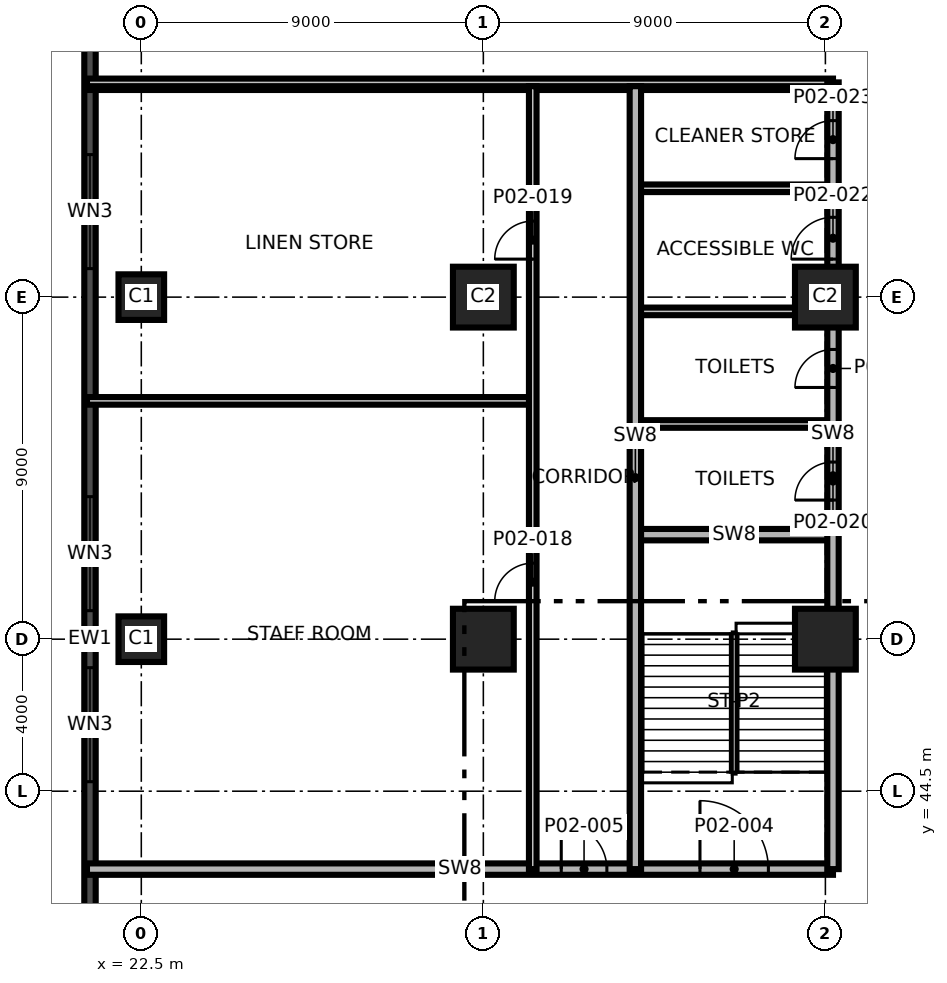
"""IFC4 building model, lengths in metres.
Left out: names, types, materials, properties, quantities, classifications, styles, units other than length and angle.
Written with IfcOpenShell. Run it as: python <this file> out.ifc"""

import sys

from ifc_helpers import new_model, si_unit, direction, frame, frame_2d, origin, origin_2d, place, context, subcontext, project, spatial, rectangle, extrude, element, fill, save


model = new_model("IFC4")
c1 = context("Model", 3, precision=1e-05, world=origin(), true_north=direction((0.0, 1.0)))
c2 = subcontext(c1, "Body", "Model", "MODEL_VIEW")
j1 = project(units=[si_unit("LENGTHUNIT", "METRE"), si_unit("PLANEANGLEUNIT", "RADIAN")], contexts=[c1])
p1 = place(None, origin())
s1 = spatial("IfcSite", under=j1, at=p1, CompositionType="ELEMENT")
p2 = place(p1, origin())
s2 = spatial("IfcBuilding", under=s1, at=p2, CompositionType="ELEMENT")
p3 = place(p2, frame((0.0, 0.0, 13.5)))
s3 = spatial("IfcBuildingStorey", under=s2, at=p3, CompositionType="ELEMENT", Elevation=13.5)
p4 = place(p3, frame((22.5, 48.5, 0.0), z_axis=(0.0, 0.0, 1.0), x_axis=(1.0, 0.0, 0.0)))
e1 = element("IfcColumn", 1, at=p4, inside=s3, PredefinedType="COLUMN", context=c2, shape_type="SweptSolid", body=[
    extrude(rectangle(XDim=1.2, YDim=1.2, at=origin_2d()), origin(), (0.0, 0.0, 1.0), 5.0),
])
for number, where, z_axis, x_axis in (
    (2, (31.5, 48.5, 0.0), (0.0, 0.0, 1.0), (1.0, 0.0, 0.0)),
    (3, (40.5, 48.5, 0.0), (0.0, 0.0, 1.0), (1.0, 0.0, 0.0)),
):
    element("IfcColumn", number, at=place(p3, frame(where, z_axis=z_axis, x_axis=x_axis)), inside=s3, PredefinedType="COLUMN", context=c2, shape_type="SweptSolid", body=[
        extrude(rectangle(XDim=1.6, YDim=1.6, at=origin_2d()), origin(), (0.0, 0.0, 1.0), 5.0),
    ])
p5 = place(p3, frame((22.5, 57.5, 0.0), z_axis=(0.0, 0.0, 1.0), x_axis=(1.0, 0.0, 0.0)))
e4 = element("IfcColumn", 4, at=p5, inside=s3, PredefinedType="COLUMN", context=c2, shape_type="SweptSolid", body=[
    extrude(rectangle(XDim=1.2, YDim=1.2, at=origin_2d()), origin(), (0.0, 0.0, 1.0), 5.0),
])
for number, where, z_axis, x_axis in (
    (5, (31.5, 57.5, 0.0), (0.0, 0.0, 1.0), (1.0, 0.0, 0.0)),
    (6, (40.5, 57.5, 0.0), (0.0, 0.0, 1.0), (1.0, 0.0, 0.0)),
):
    element("IfcColumn", number, at=place(p3, frame(where, z_axis=z_axis, x_axis=x_axis)), inside=s3, PredefinedType="COLUMN", context=c2, shape_type="SweptSolid", body=[
        extrude(rectangle(XDim=1.6, YDim=1.6, at=origin_2d()), origin(), (0.0, 0.0, 1.0), 5.0),
    ])
p6 = place(p3, frame((21.15, 79.952, 0.0), z_axis=(0.0, 0.0, 1.0), x_axis=(0.0, -1.0, 0.0)))
e7 = element("IfcWall", 7, at=p6, inside=s3, PredefinedType="SOLIDWALL", context=c2, shape_type="SweptSolid", body=[
    extrude(rectangle(XDim=62.88, YDim=0.3, at=frame_2d((31.44, 0.0))), origin(), (0.0, 0.0, 1.0), 4.7),
])
p7 = place(p6, frame((0.726, 0.0, 0.9)))
e8 = element("IfcOpeningElement", 8, at=p7, cuts=e7, PredefinedType="OPENING", context=c2, shape_type="SweptSolid", body=[
    extrude(rectangle(XDim=3.0, YDim=2.4, at=frame_2d((1.5, 1.2))), frame((0.0, 0.16, 0.0), z_axis=(0.0, -1.0, 0.0), x_axis=(1.0, 0.0, 0.0)), (0.0, 0.0, 1.0), 0.32),
])
p8 = place(p6, frame((5.202, 0.0, 0.9)))
e9 = element("IfcOpeningElement", 9, at=p8, cuts=e7, PredefinedType="OPENING", context=c2, shape_type="SweptSolid", body=[
    extrude(rectangle(XDim=3.0, YDim=2.4, at=frame_2d((1.5, 1.2))), frame((0.0, 0.16, 0.0), z_axis=(0.0, -1.0, 0.0), x_axis=(1.0, 0.0, 0.0)), (0.0, 0.0, 1.0), 0.32),
])
p9 = place(p6, frame((9.702, 0.0, 0.9)))
e10 = element("IfcOpeningElement", 10, at=p9, cuts=e7, PredefinedType="OPENING", context=c2, shape_type="SweptSolid", body=[
    extrude(rectangle(XDim=3.0, YDim=2.4, at=frame_2d((1.5, 1.2))), frame((0.0, 0.16, 0.0), z_axis=(0.0, -1.0, 0.0), x_axis=(1.0, 0.0, 0.0)), (0.0, 0.0, 1.0), 0.32),
])
p10 = place(p6, frame((18.702, 0.0, 0.9)))
e11 = element("IfcOpeningElement", 11, at=p10, cuts=e7, PredefinedType="OPENING", context=c2, shape_type="SweptSolid", body=[
    extrude(rectangle(XDim=3.0, YDim=2.4, at=frame_2d((1.5, 1.2))), frame((0.0, 0.16, 0.0), z_axis=(0.0, -1.0, 0.0), x_axis=(1.0, 0.0, 0.0)), (0.0, 0.0, 1.0), 0.32),
])
p11 = place(p6, frame((27.702, 0.0, 0.9)))
e12 = element("IfcOpeningElement", 12, at=p11, cuts=e7, PredefinedType="OPENING", context=c2, shape_type="SweptSolid", body=[
    extrude(rectangle(XDim=3.0, YDim=2.4, at=frame_2d((1.5, 1.2))), frame((0.0, 0.16, 0.0), z_axis=(0.0, -1.0, 0.0), x_axis=(1.0, 0.0, 0.0)), (0.0, 0.0, 1.0), 0.32),
])
p12 = place(p6, frame((32.202, 0.0, 0.9)))
e13 = element("IfcOpeningElement", 13, at=p12, cuts=e7, PredefinedType="OPENING", context=c2, shape_type="SweptSolid", body=[
    extrude(rectangle(XDim=3.0, YDim=2.4, at=frame_2d((1.5, 1.2))), frame((0.0, 0.16, 0.0), z_axis=(0.0, -1.0, 0.0), x_axis=(1.0, 0.0, 0.0)), (0.0, 0.0, 1.0), 0.32),
])
p13 = place(p6, frame((41.202, 0.0, 0.9)))
e14 = element("IfcOpeningElement", 14, at=p13, cuts=e7, PredefinedType="OPENING", context=c2, shape_type="SweptSolid", body=[
    extrude(rectangle(XDim=3.0, YDim=2.4, at=frame_2d((1.5, 1.2))), frame((0.0, 0.16, 0.0), z_axis=(0.0, -1.0, 0.0), x_axis=(1.0, 0.0, 0.0)), (0.0, 0.0, 1.0), 0.32),
])
p14 = place(p6, frame((45.702, 0.0, 0.9)))
e15 = element("IfcOpeningElement", 15, at=p14, cuts=e7, PredefinedType="OPENING", context=c2, shape_type="SweptSolid", body=[
    extrude(rectangle(XDim=3.0, YDim=2.4, at=frame_2d((1.5, 1.2))), frame((0.0, 0.16, 0.0), z_axis=(0.0, -1.0, 0.0), x_axis=(1.0, 0.0, 0.0)), (0.0, 0.0, 1.0), 0.32),
])
p15 = place(p6, frame((50.202, 0.0, 0.9)))
e16 = element("IfcOpeningElement", 16, at=p15, cuts=e7, PredefinedType="OPENING", context=c2, shape_type="SweptSolid", body=[
    extrude(rectangle(XDim=3.0, YDim=2.4, at=frame_2d((1.5, 1.2))), frame((0.0, 0.16, 0.0), z_axis=(0.0, -1.0, 0.0), x_axis=(1.0, 0.0, 0.0)), (0.0, 0.0, 1.0), 0.32),
])
p16 = place(p6, frame((54.702, 0.0, 0.9)))
e17 = element("IfcOpeningElement", 17, at=p16, cuts=e7, PredefinedType="OPENING", context=c2, shape_type="SweptSolid", body=[
    extrude(rectangle(XDim=3.0, YDim=2.4, at=frame_2d((1.5, 1.2))), frame((0.0, 0.16, 0.0), z_axis=(0.0, -1.0, 0.0), x_axis=(1.0, 0.0, 0.0)), (0.0, 0.0, 1.0), 0.32),
])
p17 = place(p6, frame((59.226, 0.0, 0.9)))
e18 = element("IfcOpeningElement", 18, at=p17, cuts=e7, PredefinedType="OPENING", context=c2, shape_type="SweptSolid", body=[
    extrude(rectangle(XDim=3.0, YDim=2.4, at=frame_2d((1.5, 1.2))), frame((0.0, 0.16, 0.0), z_axis=(0.0, -1.0, 0.0), x_axis=(1.0, 0.0, 0.0)), (0.0, 0.0, 1.0), 0.32),
])
p18 = place(p3, frame((21.07, 42.45, 0.0), z_axis=(0.0, 0.0, 1.0), x_axis=(1.0, 0.0, 0.0)))
e19 = element("IfcWall", 19, at=p18, inside=s3, PredefinedType="SHEAR", context=c2, shape_type="SweptSolid", body=[
    extrude(rectangle(XDim=19.63, YDim=0.3, at=frame_2d((9.815, 0.0))), origin(), (0.0, 0.0, 1.0), 4.7),
])
p19 = place(p18, frame((16.13, 0.0, 0.0)))
e20 = element("IfcOpeningElement", 20, at=p19, cuts=e19, PredefinedType="OPENING", context=c2, shape_type="SweptSolid", body=[
    extrude(rectangle(XDim=1.8, YDim=2.1, at=frame_2d((0.9, 1.05))), frame((0.0, 0.16, 0.0), z_axis=(0.0, -1.0, 0.0), x_axis=(1.0, 0.0, 0.0)), (0.0, 0.0, 1.0), 0.32),
])
p20 = place(p18, frame((12.48, 0.0, 0.0)))
e21 = element("IfcOpeningElement", 21, at=p20, cuts=e19, PredefinedType="OPENING", context=c2, shape_type="SweptSolid", body=[
    extrude(rectangle(XDim=1.2, YDim=2.1, at=frame_2d((0.6, 1.05))), frame((0.0, 0.16, 0.0), z_axis=(0.0, -1.0, 0.0), x_axis=(1.0, 0.0, 0.0)), (0.0, 0.0, 1.0), 0.32),
])
p21 = place(p3, frame((35.5, 51.25, 0.0), z_axis=(0.0, 0.0, 1.0), x_axis=(1.0, 0.0, 0.0)))
e22 = element("IfcWall", 22, at=p21, inside=s3, PredefinedType="SHEAR", context=c2, shape_type="SweptSolid", body=[
    extrude(rectangle(XDim=5.2, YDim=0.3, at=frame_2d((2.6, 0.0))), origin(), (0.0, 0.0, 1.0), 4.7),
])
p22 = place(p3, frame((35.55, 54.162, 0.0), z_axis=(0.0, 0.0, 1.0), x_axis=(1.0, 0.0, 0.0)))
e23 = element("IfcWall", 23, at=p22, inside=s3, PredefinedType="PARTITIONING", context=c2, shape_type="SweptSolid", body=[
    extrude(rectangle(XDim=5.15, YDim=0.2, at=frame_2d((2.575, 0.0))), origin(), (0.0, 0.0, 1.0), 4.7),
])
p23 = place(p3, frame((21.07, 54.77, 0.0), z_axis=(0.0, 0.0, 1.0), x_axis=(1.0, 0.0, 0.0)))
e24 = element("IfcWall", 24, at=p23, inside=s3, PredefinedType="PARTITIONING", context=c2, shape_type="SweptSolid", body=[
    extrude(rectangle(XDim=11.73, YDim=0.2, at=frame_2d((5.865, 0.0))), origin(), (0.0, 0.0, 1.0), 4.7),
])
for number, where, z_axis, x_axis in (
    (25, (35.55, 57.125, 0.0), (0.0, 0.0, 1.0), (1.0, 0.0, 0.0)),
    (26, (35.55, 60.364, 0.0), (0.0, 0.0, 1.0), (1.0, 0.0, 0.0)),
):
    element("IfcWall", number, at=place(p3, frame(where, z_axis=z_axis, x_axis=x_axis)), inside=s3, PredefinedType="PARTITIONING", context=c2, shape_type="SweptSolid", body=[
        extrude(rectangle(XDim=5.15, YDim=0.2, at=frame_2d((2.575, 0.0))), origin(), (0.0, 0.0, 1.0), 4.7),
    ])
p24 = place(p3, frame((21.07, 63.05, 0.0), z_axis=(0.0, 0.0, 1.0), x_axis=(1.0, 0.0, 0.0)))
e27 = element("IfcWall", 27, at=p24, inside=s3, PredefinedType="PARTITIONING", context=c2, shape_type="SweptSolid", body=[
    extrude(rectangle(XDim=14.43, YDim=0.2, at=frame_2d((7.215, 0.0))), origin(), (0.0, 0.0, 1.0), 4.7),
])
p25 = place(p3, frame((35.55, 63.05, 0.0), z_axis=(0.0, 0.0, 1.0), x_axis=(1.0, 0.0, 0.0)))
e28 = element("IfcWall", 28, at=p25, inside=s3, PredefinedType="PARTITIONING", context=c2, shape_type="SweptSolid", body=[
    extrude(rectangle(XDim=5.15, YDim=0.2, at=frame_2d((2.575, 0.0))), origin(), (0.0, 0.0, 1.0), 4.7),
])
p26 = place(p3, frame((21.07, 63.15, 0.0), z_axis=(0.0, 0.0, 1.0), x_axis=(1.0, 0.0, 0.0)))
e29 = element("IfcWall", 29, at=p26, inside=s3, PredefinedType="PARTITIONING", context=c2, shape_type="SweptSolid", body=[
    extrude(rectangle(XDim=19.63, YDim=0.2, at=frame_2d((9.815, 0.0))), origin(), (0.0, 0.0, 1.0), 4.7),
])
p27 = place(p3, frame((32.8, 42.45, 0.0), z_axis=(0.0, 0.0, 1.0), x_axis=(0.0, 1.0, 0.0)))
e30 = element("IfcWall", 30, at=p27, inside=s3, PredefinedType="PARTITIONING", context=c2, shape_type="SweptSolid", body=[
    extrude(rectangle(XDim=20.6, YDim=0.2, at=frame_2d((10.3, 0.0))), origin(), (0.0, 0.0, 1.0), 4.7),
])
p28 = place(p27, frame((7.05, 0.0, 0.0)))
e31 = element("IfcOpeningElement", 31, at=p28, cuts=e30, PredefinedType="OPENING", context=c2, shape_type="SweptSolid", body=[
    extrude(rectangle(XDim=1.0, YDim=2.1, at=frame_2d((0.5, 1.05))), frame((0.0, 0.11, 0.0), z_axis=(0.0, -1.0, 0.0), x_axis=(1.0, 0.0, 0.0)), (0.0, 0.0, 1.0), 0.22),
])
p29 = place(p27, frame((16.05, 0.0, 0.0)))
e32 = element("IfcOpeningElement", 32, at=p29, cuts=e30, PredefinedType="OPENING", context=c2, shape_type="SweptSolid", body=[
    extrude(rectangle(XDim=1.0, YDim=2.1, at=frame_2d((0.5, 1.05))), frame((0.0, 0.11, 0.0), z_axis=(0.0, -1.0, 0.0), x_axis=(1.0, 0.0, 0.0)), (0.0, 0.0, 1.0), 0.22),
])
p30 = place(p3, frame((35.5, 42.45, 0.0), z_axis=(0.0, 0.0, 1.0), x_axis=(0.0, 1.0, 0.0)))
e33 = element("IfcWall", 33, at=p30, inside=s3, PredefinedType="SHEAR", context=c2, shape_type="SweptSolid", body=[
    extrude(rectangle(XDim=20.6, YDim=0.3, at=frame_2d((10.3, 0.0))), origin(), (0.0, 0.0, 1.0), 4.7),
])
p31 = place(p3, frame((40.7, 42.45, 0.0), z_axis=(0.0, 0.0, 1.0), x_axis=(0.0, 1.0, 0.0)))
e34 = element("IfcWall", 34, at=p31, inside=s3, PredefinedType="SHEAR", context=c2, shape_type="SweptSolid", body=[
    extrude(rectangle(XDim=20.7, YDim=0.3, at=frame_2d((10.35, 0.0))), origin(), (0.0, 0.0, 1.0), 4.7),
])
p32 = place(p31, frame((9.71, 0.0, 0.0)))
e35 = element("IfcOpeningElement", 35, at=p32, cuts=e34, PredefinedType="OPENING", context=c2, shape_type="SweptSolid", body=[
    extrude(rectangle(XDim=1.0, YDim=2.1, at=frame_2d((0.5, 1.05))), frame((0.0, 0.16, 0.0), z_axis=(0.0, -1.0, 0.0), x_axis=(1.0, 0.0, 0.0)), (0.0, 0.0, 1.0), 0.32),
])
p33 = place(p31, frame((12.673, 0.0, 0.0)))
e36 = element("IfcOpeningElement", 36, at=p33, cuts=e34, PredefinedType="OPENING", context=c2, shape_type="SweptSolid", body=[
    extrude(rectangle(XDim=1.0, YDim=2.1, at=frame_2d((0.5, 1.05))), frame((0.0, 0.16, 0.0), z_axis=(0.0, -1.0, 0.0), x_axis=(1.0, 0.0, 0.0)), (0.0, 0.0, 1.0), 0.32),
])
p34 = place(p31, frame((16.05, 0.0, 0.0)))
e37 = element("IfcOpeningElement", 37, at=p34, cuts=e34, PredefinedType="OPENING", context=c2, shape_type="SweptSolid", body=[
    extrude(rectangle(XDim=1.1, YDim=2.1, at=frame_2d((0.55, 1.05))), frame((0.0, 0.16, 0.0), z_axis=(0.0, -1.0, 0.0), x_axis=(1.0, 0.0, 0.0)), (0.0, 0.0, 1.0), 0.32),
])
p35 = place(p31, frame((18.694, 0.0, 0.0)))
e38 = element("IfcOpeningElement", 38, at=p35, cuts=e34, PredefinedType="OPENING", context=c2, shape_type="SweptSolid", body=[
    extrude(rectangle(XDim=1.0, YDim=2.1, at=frame_2d((0.5, 1.05))), frame((0.0, 0.16, 0.0), z_axis=(0.0, -1.0, 0.0), x_axis=(1.0, 0.0, 0.0)), (0.0, 0.0, 1.0), 0.32),
])
p36 = place(p10, origin())
e39 = element("IfcWindow", 39, at=p36, inside=s3, PartitioningType="SINGLE_PANEL", PredefinedType="WINDOW", context=c2, shape_type="SweptSolid", body=[
    extrude(rectangle(XDim=3.0, YDim=2.4, at=frame_2d((1.5, 1.2))), frame((0.0, 0.03, 0.0), z_axis=(0.0, -1.0, 0.0), x_axis=(1.0, 0.0, 0.0)), (0.0, 0.0, 1.0), 0.06),
])
fill(e11, e39)
p37 = place(p11, origin())
e40 = element("IfcWindow", 40, at=p37, inside=s3, PartitioningType="SINGLE_PANEL", PredefinedType="WINDOW", context=c2, shape_type="SweptSolid", body=[
    extrude(rectangle(XDim=3.0, YDim=2.4, at=frame_2d((1.5, 1.2))), frame((0.0, 0.03, 0.0), z_axis=(0.0, -1.0, 0.0), x_axis=(1.0, 0.0, 0.0)), (0.0, 0.0, 1.0), 0.06),
])
fill(e12, e40)
p38 = place(p12, origin())
e41 = element("IfcWindow", 41, at=p38, inside=s3, PartitioningType="SINGLE_PANEL", PredefinedType="WINDOW", context=c2, shape_type="SweptSolid", body=[
    extrude(rectangle(XDim=3.0, YDim=2.4, at=frame_2d((1.5, 1.2))), frame((0.0, 0.03, 0.0), z_axis=(0.0, -1.0, 0.0), x_axis=(1.0, 0.0, 0.0)), (0.0, 0.0, 1.0), 0.06),
])
fill(e13, e41)
p39 = place(p19, origin())
e42 = element("IfcDoor", 42, at=p39, inside=s3, OperationType="SINGLE_SWING_RIGHT", PredefinedType="DOOR", context=c2, shape_type="SweptSolid", body=[
    extrude(rectangle(XDim=1.8, YDim=2.1, at=frame_2d((0.9, 1.05))), frame((0.0, 0.025, 0.0), z_axis=(0.0, -1.0, 0.0), x_axis=(1.0, 0.0, 0.0)), (0.0, 0.0, 1.0), 0.05),
])
fill(e20, e42)
p40 = place(p20, origin())
e43 = element("IfcDoor", 43, at=p40, inside=s3, OperationType="SINGLE_SWING_LEFT", PredefinedType="DOOR", context=c2, shape_type="SweptSolid", body=[
    extrude(rectangle(XDim=1.2, YDim=2.1, at=frame_2d((0.6, 1.05))), frame((0.0, 0.025, 0.0), z_axis=(0.0, -1.0, 0.0), x_axis=(1.0, 0.0, 0.0)), (0.0, 0.0, 1.0), 0.05),
])
fill(e21, e43)
p41 = place(p28, origin())
e44 = element("IfcDoor", 44, at=p41, inside=s3, OperationType="SINGLE_SWING_RIGHT", PredefinedType="DOOR", context=c2, shape_type="SweptSolid", body=[
    extrude(rectangle(XDim=1.0, YDim=2.1, at=frame_2d((0.5, 1.05))), frame((0.0, 0.025, 0.0), z_axis=(0.0, -1.0, 0.0), x_axis=(1.0, 0.0, 0.0)), (0.0, 0.0, 1.0), 0.05),
])
fill(e31, e44)
p42 = place(p29, origin())
e45 = element("IfcDoor", 45, at=p42, inside=s3, OperationType="SINGLE_SWING_LEFT", PredefinedType="DOOR", context=c2, shape_type="SweptSolid", body=[
    extrude(rectangle(XDim=1.0, YDim=2.1, at=frame_2d((0.5, 1.05))), frame((0.0, 0.025, 0.0), z_axis=(0.0, -1.0, 0.0), x_axis=(1.0, 0.0, 0.0)), (0.0, 0.0, 1.0), 0.05),
])
fill(e32, e45)
p43 = place(p32, origin())
e46 = element("IfcDoor", 46, at=p43, inside=s3, OperationType="SINGLE_SWING_RIGHT", PredefinedType="DOOR", context=c2, shape_type="SweptSolid", body=[
    extrude(rectangle(XDim=1.0, YDim=2.1, at=frame_2d((0.5, 1.05))), frame((0.0, 0.025, 0.0), z_axis=(0.0, -1.0, 0.0), x_axis=(1.0, 0.0, 0.0)), (0.0, 0.0, 1.0), 0.05),
])
fill(e35, e46)
p44 = place(p33, origin())
e47 = element("IfcDoor", 47, at=p44, inside=s3, OperationType="SINGLE_SWING_LEFT", PredefinedType="DOOR", context=c2, shape_type="SweptSolid", body=[
    extrude(rectangle(XDim=1.0, YDim=2.1, at=frame_2d((0.5, 1.05))), frame((0.0, 0.025, 0.0), z_axis=(0.0, -1.0, 0.0), x_axis=(1.0, 0.0, 0.0)), (0.0, 0.0, 1.0), 0.05),
])
fill(e36, e47)
p45 = place(p34, origin())
e48 = element("IfcDoor", 48, at=p45, inside=s3, OperationType="SINGLE_SWING_RIGHT", PredefinedType="DOOR", context=c2, shape_type="SweptSolid", body=[
    extrude(rectangle(XDim=1.1, YDim=2.1, at=frame_2d((0.55, 1.05))), frame((0.0, 0.025, 0.0), z_axis=(0.0, -1.0, 0.0), x_axis=(1.0, 0.0, 0.0)), (0.0, 0.0, 1.0), 0.05),
])
fill(e37, e48)
p46 = place(p35, origin())
e49 = element("IfcDoor", 49, at=p46, inside=s3, OperationType="SINGLE_SWING_LEFT", PredefinedType="DOOR", context=c2, shape_type="SweptSolid", body=[
    extrude(rectangle(XDim=1.0, YDim=2.1, at=frame_2d((0.5, 1.05))), frame((0.0, 0.025, 0.0), z_axis=(0.0, -1.0, 0.0), x_axis=(1.0, 0.0, 0.0)), (0.0, 0.0, 1.0), 0.05),
])
fill(e38, e49)
save(model, sys.argv[1])
